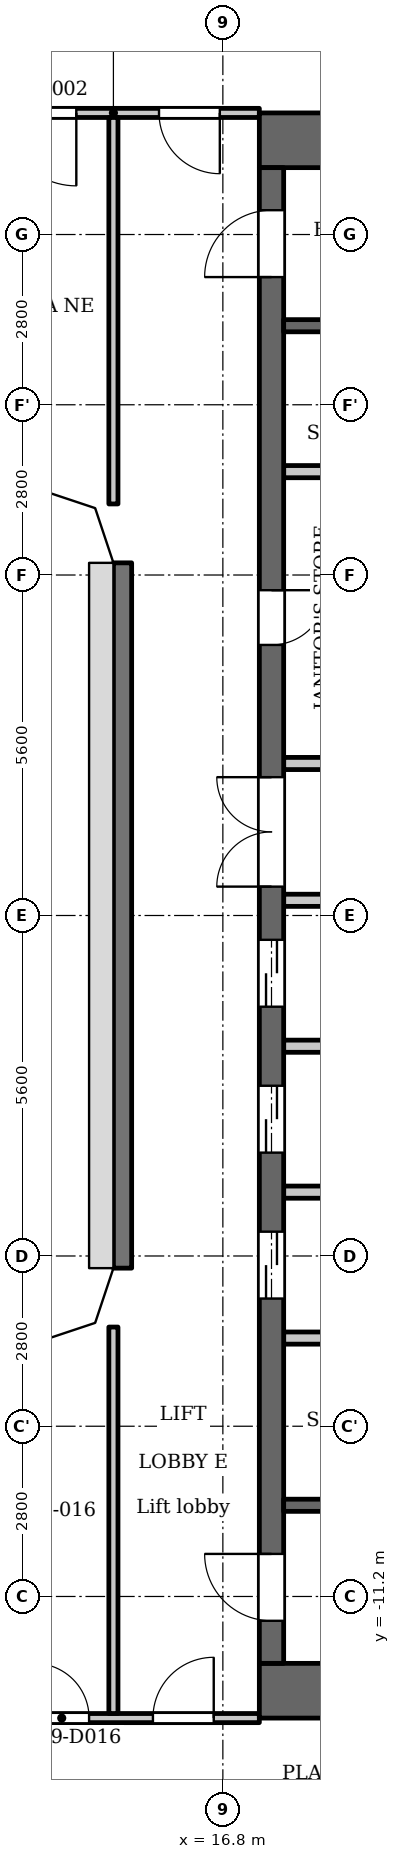
"""IFC4 building model, lengths in metres.
Left out: names, types, materials, properties, quantities, classifications, styles, units other than length and angle.
Written with IfcOpenShell. Run it as: python <this file> out.ifc"""

import sys

from ifc_helpers import new_model, si_unit, direction, frame, frame_2d, origin, place, context, subcontext, project, spatial, polyline, rectangle, outline, extrude, element, fill, save


model = new_model("IFC4")
c1 = context("Model", 3, precision=1e-05, world=origin(), true_north=direction((0.0, 1.0)))
c2 = subcontext(c1, "Body", "Model", "MODEL_VIEW")
j1 = project(units=[si_unit("LENGTHUNIT", "METRE"), si_unit("PLANEANGLEUNIT", "RADIAN")], contexts=[c1])
p1 = place(None, origin())
s1 = spatial("IfcSite", under=j1, at=p1, CompositionType="ELEMENT")
p2 = place(p1, origin())
s2 = spatial("IfcBuilding", under=s1, at=p2, CompositionType="ELEMENT")
p3 = place(p2, frame((0.0, 0.0, 77.9)))
s3 = spatial("IfcBuildingStorey", under=s2, at=p3, CompositionType="ELEMENT", Elevation=77.9)
p4 = place(p3, frame((15.15, 5.8, 0.0), z_axis=(0.0, 0.0, 1.0), x_axis=(0.0, -1.0, 0.0)))
e1 = element("IfcWall", 1, at=p4, inside=s3, PredefinedType="SOLIDWALL", context=c2, shape_type="SweptSolid", body=[
    extrude(rectangle(XDim=11.6, YDim=0.3, at=frame_2d((5.8, 0.0))), origin(), (0.0, 0.0, 1.0), 5.1),
])
for number, where, z_axis, x_axis in (
    (2, (17.4, 12.75, 0.0), (0.0, 0.0, 1.0), (1.0, 0.0, 0.0)),
    (3, (17.4, -12.75, 0.0), (0.0, 0.0, 1.0), (1.0, 0.0, 0.0)),
):
    element("IfcWall", number, at=place(p3, frame(where, z_axis=z_axis, x_axis=x_axis)), inside=s3, PredefinedType="SHEAR", context=c2, shape_type="SweptSolid", body=[
        extrude(rectangle(XDim=10.4, YDim=0.9, at=frame_2d((5.2, 0.0))), origin(), (0.0, 0.0, 1.0), 5.1),
    ])
p5 = place(p3, frame((17.6, -12.3, 0.0), z_axis=(0.0, 0.0, 1.0), x_axis=(0.0, 1.0, 0.0)))
e4 = element("IfcWall", 4, at=p5, inside=s3, PredefinedType="SHEAR", context=c2, shape_type="SweptSolid", body=[
    extrude(rectangle(XDim=24.6, YDim=0.4, at=frame_2d((12.3, 0.0))), origin(), (0.0, 0.0, 1.0), 5.1),
])
p6 = place(p5, frame((6.0, 0.0, 0.0)))
e5 = element("IfcOpeningElement", 5, at=p6, cuts=e4, PredefinedType="OPENING", context=c2, shape_type="SweptSolid", body=[
    extrude(rectangle(XDim=1.1, YDim=2.1, at=frame_2d((0.55, 1.05))), frame((0.0, 0.21, 0.0), z_axis=(0.0, -1.0, 0.0), x_axis=(1.0, 0.0, 0.0)), (0.0, 0.0, 1.0), 0.42),
])
p7 = place(p5, frame((8.4, 0.0, 0.0)))
e6 = element("IfcOpeningElement", 6, at=p7, cuts=e4, PredefinedType="OPENING", context=c2, shape_type="SweptSolid", body=[
    extrude(rectangle(XDim=1.1, YDim=2.1, at=frame_2d((0.55, 1.05))), frame((0.0, 0.21, 0.0), z_axis=(0.0, -1.0, 0.0), x_axis=(1.0, 0.0, 0.0)), (0.0, 0.0, 1.0), 0.42),
])
p8 = place(p5, frame((10.8, 0.0, 0.0)))
e7 = element("IfcOpeningElement", 7, at=p8, cuts=e4, PredefinedType="OPENING", context=c2, shape_type="SweptSolid", body=[
    extrude(rectangle(XDim=1.1, YDim=2.1, at=frame_2d((0.55, 1.05))), frame((0.0, 0.21, 0.0), z_axis=(0.0, -1.0, 0.0), x_axis=(1.0, 0.0, 0.0)), (0.0, 0.0, 1.0), 0.42),
])
p9 = place(p5, frame((16.75, 0.0, 0.0)))
e8 = element("IfcOpeningElement", 8, at=p9, cuts=e4, PredefinedType="OPENING", context=c2, shape_type="SweptSolid", body=[
    extrude(rectangle(XDim=0.9, YDim=2.1, at=frame_2d((0.45, 1.05))), frame((0.0, 0.21, 0.0), z_axis=(0.0, -1.0, 0.0), x_axis=(1.0, 0.0, 0.0)), (0.0, 0.0, 1.0), 0.42),
])
p10 = place(p5, frame((22.8, 0.0, 0.0)))
e9 = element("IfcOpeningElement", 9, at=p10, cuts=e4, PredefinedType="OPENING", context=c2, shape_type="SweptSolid", body=[
    extrude(rectangle(XDim=1.1, YDim=2.1, at=frame_2d((0.55, 1.05))), frame((0.0, 0.21, 0.0), z_axis=(0.0, -1.0, 0.0), x_axis=(1.0, 0.0, 0.0)), (0.0, 0.0, 1.0), 0.42),
])
p11 = place(p5, frame((0.7, 0.0, 0.0)))
e10 = element("IfcOpeningElement", 10, at=p11, cuts=e4, PredefinedType="OPENING", context=c2, shape_type="SweptSolid", body=[
    extrude(rectangle(XDim=1.1, YDim=2.1, at=frame_2d((0.55, 1.05))), frame((0.0, 0.21, 0.0), z_axis=(0.0, -1.0, 0.0), x_axis=(1.0, 0.0, 0.0)), (0.0, 0.0, 1.0), 0.42),
])
p12 = place(p5, frame((12.775, 0.0, 0.0)))
e11 = element("IfcOpeningElement", 11, at=p12, cuts=e4, PredefinedType="OPENING", context=c2, shape_type="SweptSolid", body=[
    extrude(rectangle(XDim=1.8, YDim=2.1, at=frame_2d((0.9, 1.05))), frame((0.0, 0.21, 0.0), z_axis=(0.0, -1.0, 0.0), x_axis=(1.0, 0.0, 0.0)), (0.0, 0.0, 1.0), 0.42),
])
p13 = place(p3, frame((17.8, -9.7, 0.0), z_axis=(0.0, 0.0, 1.0), x_axis=(1.0, 0.0, 0.0)))
e12 = element("IfcWall", 12, at=p13, inside=s3, PredefinedType="SHEAR", context=c2, shape_type="SweptSolid", body=[
    extrude(rectangle(XDim=8.3, YDim=0.2, at=frame_2d((4.15, 0.0))), origin(), (0.0, 0.0, 1.0), 5.1),
])
p14 = place(p13, frame((0.85, 0.0, 0.0)))
e13 = element("IfcOpeningElement", 13, at=p14, cuts=e12, PredefinedType="OPENING", context=c2, shape_type="SweptSolid", body=[
    extrude(rectangle(XDim=1.1, YDim=2.1, at=frame_2d((0.55, 1.05))), frame((0.0, 0.11, 0.0), z_axis=(0.0, -1.0, 0.0), x_axis=(1.0, 0.0, 0.0)), (0.0, 0.0, 1.0), 0.22),
])
p15 = place(p13, frame((3.75, 0.0, 0.0)))
e14 = element("IfcOpeningElement", 14, at=p15, cuts=e12, PredefinedType="OPENING", context=c2, shape_type="SweptSolid", body=[
    extrude(rectangle(XDim=1.1, YDim=2.1, at=frame_2d((0.55, 1.05))), frame((0.0, 0.11, 0.0), z_axis=(0.0, -1.0, 0.0), x_axis=(1.0, 0.0, 0.0)), (0.0, 0.0, 1.0), 0.22),
])
for number, where, z_axis, x_axis in (
    (15, (17.8, -6.95, 0.0), (0.0, 0.0, 1.0), (1.0, 0.0, 0.0)),
    (16, (17.8, -4.55, 0.0), (0.0, 0.0, 1.0), (1.0, 0.0, 0.0)),
    (17, (17.8, -2.15, 0.0), (0.0, 0.0, 1.0), (1.0, 0.0, 0.0)),
):
    element("IfcWall", number, at=place(p3, frame(where, z_axis=z_axis, x_axis=x_axis)), inside=s3, PredefinedType="PARTITIONING", context=c2, shape_type="SweptSolid", body=[
        extrude(rectangle(XDim=2.8, YDim=0.2, at=frame_2d((1.4, 0.0))), origin(), (0.0, 0.0, 1.0), 5.1),
    ])
p16 = place(p3, frame((17.8, 0.25, 0.0), z_axis=(0.0, 0.0, 1.0), x_axis=(1.0, 0.0, 0.0)))
e18 = element("IfcWall", 18, at=p16, inside=s3, PredefinedType="PARTITIONING", context=c2, shape_type="SweptSolid", body=[
    extrude(rectangle(XDim=3.0, YDim=0.2, at=frame_2d((1.5, 0.0))), origin(), (0.0, 0.0, 1.0), 5.1),
])
p17 = place(p3, frame((17.8, 2.5, 0.0), z_axis=(0.0, 0.0, 1.0), x_axis=(1.0, 0.0, 0.0)))
e19 = element("IfcWall", 19, at=p17, inside=s3, PredefinedType="PARTITIONING", context=c2, shape_type="SweptSolid", body=[
    extrude(rectangle(XDim=3.0, YDim=0.2, at=frame_2d((1.5, 0.0))), origin(), (0.0, 0.0, 1.0), 5.1),
])
p18 = place(p17, frame((1.7, 0.0, 0.0)))
e20 = element("IfcOpeningElement", 20, at=p18, cuts=e19, PredefinedType="OPENING", context=c2, shape_type="SweptSolid", body=[
    extrude(rectangle(XDim=0.9, YDim=2.1, at=frame_2d((0.45, 1.05))), frame((0.0, 0.11, 0.0), z_axis=(0.0, -1.0, 0.0), x_axis=(1.0, 0.0, 0.0)), (0.0, 0.0, 1.0), 0.22),
])
p19 = place(p3, frame((17.8, 7.3, 0.0), z_axis=(0.0, 0.0, 1.0), x_axis=(1.0, 0.0, 0.0)))
e21 = element("IfcWall", 21, at=p19, inside=s3, PredefinedType="PARTITIONING", context=c2, shape_type="SweptSolid", body=[
    extrude(rectangle(XDim=2.8, YDim=0.2, at=frame_2d((1.4, 0.0))), origin(), (0.0, 0.0, 1.0), 5.1),
])
p20 = place(p3, frame((17.8, 9.7, 0.0), z_axis=(0.0, 0.0, 1.0), x_axis=(1.0, 0.0, 0.0)))
e22 = element("IfcWall", 22, at=p20, inside=s3, PredefinedType="SHEAR", context=c2, shape_type="SweptSolid", body=[
    extrude(rectangle(XDim=8.3, YDim=0.2, at=frame_2d((4.15, 0.0))), origin(), (0.0, 0.0, 1.0), 5.1),
])
p21 = place(p20, frame((0.85, 0.0, 0.0)))
e23 = element("IfcOpeningElement", 23, at=p21, cuts=e22, PredefinedType="OPENING", context=c2, shape_type="SweptSolid", body=[
    extrude(rectangle(XDim=1.1, YDim=2.1, at=frame_2d((0.55, 1.05))), frame((0.0, 0.11, 0.0), z_axis=(0.0, -1.0, 0.0), x_axis=(1.0, 0.0, 0.0)), (0.0, 0.0, 1.0), 0.22),
])
p22 = place(p20, frame((3.75, 0.0, 0.0)))
e24 = element("IfcOpeningElement", 24, at=p22, cuts=e22, PredefinedType="OPENING", context=c2, shape_type="SweptSolid", body=[
    extrude(rectangle(XDim=1.1, YDim=2.1, at=frame_2d((0.55, 1.05))), frame((0.0, 0.11, 0.0), z_axis=(0.0, -1.0, 0.0), x_axis=(1.0, 0.0, 0.0)), (0.0, 0.0, 1.0), 0.22),
])
p23 = place(p3, frame((11.52, -13.2, 0.0), z_axis=(0.0, 0.0, 1.0), x_axis=(1.0, 0.0, 0.0)))
e25 = element("IfcWall", 25, at=p23, inside=s3, PredefinedType="PARTITIONING", context=c2, shape_type="SweptSolid", body=[
    extrude(rectangle(XDim=5.88, YDim=0.15, at=frame_2d((2.94, 0.0))), origin(), (0.0, 0.0, 1.0), 5.1),
])
p24 = place(p23, frame((4.13, 0.0, 0.0)))
e26 = element("IfcOpeningElement", 26, at=p24, cuts=e25, PredefinedType="OPENING", context=c2, shape_type="SweptSolid", body=[
    extrude(rectangle(XDim=1.0, YDim=2.1, at=frame_2d((0.5, 1.05))), frame((0.0, 0.085, 0.0), z_axis=(0.0, -1.0, 0.0), x_axis=(1.0, 0.0, 0.0)), (0.0, 0.0, 1.0), 0.17),
])
p25 = place(p23, frame((0.28, 0.0, 0.0)))
e27 = element("IfcOpeningElement", 27, at=p25, cuts=e25, PredefinedType="OPENING", context=c2, shape_type="SweptSolid", body=[
    extrude(rectangle(XDim=0.9, YDim=2.1, at=frame_2d((0.45, 1.05))), frame((0.0, 0.085, 0.0), z_axis=(0.0, -1.0, 0.0), x_axis=(1.0, 0.0, 0.0)), (0.0, 0.0, 1.0), 0.17),
])
p26 = place(p23, frame((2.18, 0.0, 0.0)))
e28 = element("IfcOpeningElement", 28, at=p26, cuts=e25, PredefinedType="OPENING", context=c2, shape_type="SweptSolid", body=[
    extrude(rectangle(XDim=0.9, YDim=2.1, at=frame_2d((0.45, 1.05))), frame((0.0, 0.085, 0.0), z_axis=(0.0, -1.0, 0.0), x_axis=(1.0, 0.0, 0.0)), (0.0, 0.0, 1.0), 0.17),
])
p27 = place(p3, frame((11.52, 13.2, 0.0), z_axis=(0.0, 0.0, 1.0), x_axis=(1.0, 0.0, 0.0)))
e29 = element("IfcWall", 29, at=p27, inside=s3, PredefinedType="PARTITIONING", context=c2, shape_type="SweptSolid", body=[
    extrude(rectangle(XDim=5.88, YDim=0.15, at=frame_2d((2.94, 0.0))), origin(), (0.0, 0.0, 1.0), 5.1),
])
p28 = place(p27, frame((4.23, 0.0, 0.0)))
e30 = element("IfcOpeningElement", 30, at=p28, cuts=e29, PredefinedType="OPENING", context=c2, shape_type="SweptSolid", body=[
    extrude(rectangle(XDim=1.0, YDim=2.1, at=frame_2d((0.5, 1.05))), frame((0.0, 0.085, 0.0), z_axis=(0.0, -1.0, 0.0), x_axis=(1.0, 0.0, 0.0)), (0.0, 0.0, 1.0), 0.17),
])
p29 = place(p27, frame((1.67, 0.0, 0.0)))
e31 = element("IfcOpeningElement", 31, at=p29, cuts=e29, PredefinedType="OPENING", context=c2, shape_type="SweptSolid", body=[
    extrude(rectangle(XDim=1.2, YDim=2.1, at=frame_2d((0.6, 1.05))), frame((0.0, 0.085, 0.0), z_axis=(0.0, -1.0, 0.0), x_axis=(1.0, 0.0, 0.0)), (0.0, 0.0, 1.0), 0.17),
])
for number, where, z_axis, x_axis in (
    (32, (15.0, -13.125, 0.0), (0.0, 0.0, 1.0), (0.0, 1.0, 0.0)),
    (33, (15.0, 6.769, 0.0), (0.0, 0.0, 1.0), (0.0, 1.0, 0.0)),
):
    element("IfcWall", number, at=place(p3, frame(where, z_axis=z_axis, x_axis=x_axis)), inside=s3, PredefinedType="PARTITIONING", context=c2, shape_type="SweptSolid", body=[
        extrude(rectangle(XDim=6.356, YDim=0.15, at=frame_2d((3.178, 0.0))), origin(), (0.0, 0.0, 1.0), 5.1),
    ])
p30 = place(p3, origin())
e34 = element("IfcWall", 34, at=p30, inside=s3, PredefinedType="SOLIDWALL", context=c2, shape_type="SweptSolid", body=[
    extrude(outline(polyline([(13.8, 7.0), (14.7, 6.7), (15.0, 5.8), (15.3, 5.8), (15.3, 5.849), (14.937, 6.937), (13.849, 7.3), (13.8, 7.3), (13.8, 7.0)])), origin(), (0.0, 0.0, 1.0), 5.1),
])
e35 = element("IfcWall", 35, at=p30, inside=s3, PredefinedType="SOLIDWALL", context=c2, shape_type="SweptSolid", body=[
    extrude(outline(polyline([(15.0, -5.8), (14.7, -6.7), (13.8, -7.0), (13.8, -7.3), (13.849, -7.3), (14.937, -6.937), (15.3, -5.849), (15.3, -5.8), (15.0, -5.8)])), origin(), (0.0, 0.0, 1.0), 5.1),
])
p31 = place(p6, origin())
e36 = element("IfcDoor", 36, at=p31, inside=s3, OperationType="DOUBLE_DOOR_SLIDING", PredefinedType="DOOR", context=c2, shape_type="SweptSolid", body=[
    extrude(rectangle(XDim=1.1, YDim=2.1, at=frame_2d((0.55, 1.05))), frame((0.0, 0.025, 0.0), z_axis=(0.0, -1.0, 0.0), x_axis=(1.0, 0.0, 0.0)), (0.0, 0.0, 1.0), 0.05),
])
fill(e5, e36)
p32 = place(p7, origin())
e37 = element("IfcDoor", 37, at=p32, inside=s3, OperationType="DOUBLE_DOOR_SLIDING", PredefinedType="DOOR", context=c2, shape_type="SweptSolid", body=[
    extrude(rectangle(XDim=1.1, YDim=2.1, at=frame_2d((0.55, 1.05))), frame((0.0, 0.025, 0.0), z_axis=(0.0, -1.0, 0.0), x_axis=(1.0, 0.0, 0.0)), (0.0, 0.0, 1.0), 0.05),
])
fill(e6, e37)
p33 = place(p8, origin())
e38 = element("IfcDoor", 38, at=p33, inside=s3, OperationType="DOUBLE_DOOR_SLIDING", PredefinedType="DOOR", context=c2, shape_type="SweptSolid", body=[
    extrude(rectangle(XDim=1.1, YDim=2.1, at=frame_2d((0.55, 1.05))), frame((0.0, 0.025, 0.0), z_axis=(0.0, -1.0, 0.0), x_axis=(1.0, 0.0, 0.0)), (0.0, 0.0, 1.0), 0.05),
])
fill(e7, e38)
p34 = place(p9, origin())
e39 = element("IfcDoor", 39, at=p34, inside=s3, OperationType="SINGLE_SWING_RIGHT", PredefinedType="DOOR", context=c2, shape_type="SweptSolid", body=[
    extrude(rectangle(XDim=0.9, YDim=2.1, at=frame_2d((0.45, 1.05))), frame((0.0, 0.025, 0.0), z_axis=(0.0, -1.0, 0.0), x_axis=(1.0, 0.0, 0.0)), (0.0, 0.0, 1.0), 0.05),
])
fill(e8, e39)
p35 = place(p10, origin())
e40 = element("IfcDoor", 40, at=p35, inside=s3, OperationType="SINGLE_SWING_RIGHT", PredefinedType="DOOR", context=c2, shape_type="SweptSolid", body=[
    extrude(rectangle(XDim=1.1, YDim=2.1, at=frame_2d((0.55, 1.05))), frame((0.0, 0.025, 0.0), z_axis=(0.0, -1.0, 0.0), x_axis=(1.0, 0.0, 0.0)), (0.0, 0.0, 1.0), 0.05),
])
fill(e9, e40)
p36 = place(p11, origin())
e41 = element("IfcDoor", 41, at=p36, inside=s3, OperationType="SINGLE_SWING_LEFT", PredefinedType="DOOR", context=c2, shape_type="SweptSolid", body=[
    extrude(rectangle(XDim=1.1, YDim=2.1, at=frame_2d((0.55, 1.05))), frame((0.0, 0.025, 0.0), z_axis=(0.0, -1.0, 0.0), x_axis=(1.0, 0.0, 0.0)), (0.0, 0.0, 1.0), 0.05),
])
fill(e10, e41)
p37 = place(p12, origin())
e42 = element("IfcDoor", 42, at=p37, inside=s3, OperationType="DOUBLE_DOOR_SINGLE_SWING", PredefinedType="DOOR", context=c2, shape_type="SweptSolid", body=[
    extrude(rectangle(XDim=1.8, YDim=2.1, at=frame_2d((0.9, 1.05))), frame((0.0, 0.025, 0.0), z_axis=(0.0, -1.0, 0.0), x_axis=(1.0, 0.0, 0.0)), (0.0, 0.0, 1.0), 0.05),
])
fill(e11, e42)
p38 = place(p28, origin())
e43 = element("IfcDoor", 43, at=p38, inside=s3, OperationType="SINGLE_SWING_RIGHT", PredefinedType="DOOR", context=c2, shape_type="SweptSolid", body=[
    extrude(rectangle(XDim=1.0, YDim=2.1, at=frame_2d((0.5, 1.05))), frame((0.0, 0.025, 0.0), z_axis=(0.0, -1.0, 0.0), x_axis=(1.0, 0.0, 0.0)), (0.0, 0.0, 1.0), 0.05),
])
fill(e30, e43)
p39 = place(p29, origin())
e44 = element("IfcDoor", 44, at=p39, inside=s3, OperationType="SINGLE_SWING_RIGHT", PredefinedType="DOOR", context=c2, shape_type="SweptSolid", body=[
    extrude(rectangle(XDim=1.2, YDim=2.1, at=frame_2d((0.6, 1.05))), frame((0.0, 0.025, 0.0), z_axis=(0.0, -1.0, 0.0), x_axis=(1.0, 0.0, 0.0)), (0.0, 0.0, 1.0), 0.05),
])
fill(e31, e44)
p40 = place(p24, origin())
e45 = element("IfcDoor", 45, at=p40, inside=s3, OperationType="SINGLE_SWING_LEFT", PredefinedType="DOOR", context=c2, shape_type="SweptSolid", body=[
    extrude(rectangle(XDim=1.0, YDim=2.1, at=frame_2d((0.5, 1.05))), frame((0.0, 0.025, 0.0), z_axis=(0.0, -1.0, 0.0), x_axis=(1.0, 0.0, 0.0)), (0.0, 0.0, 1.0), 0.05),
])
fill(e26, e45)
p41 = place(p26, origin())
e46 = element("IfcDoor", 46, at=p41, inside=s3, OperationType="SINGLE_SWING_RIGHT", PredefinedType="DOOR", context=c2, shape_type="SweptSolid", body=[
    extrude(rectangle(XDim=0.9, YDim=2.1, at=frame_2d((0.45, 1.05))), frame((0.0, 0.025, 0.0), z_axis=(0.0, -1.0, 0.0), x_axis=(1.0, 0.0, 0.0)), (0.0, 0.0, 1.0), 0.05),
])
fill(e28, e46)
save(model, sys.argv[1])
